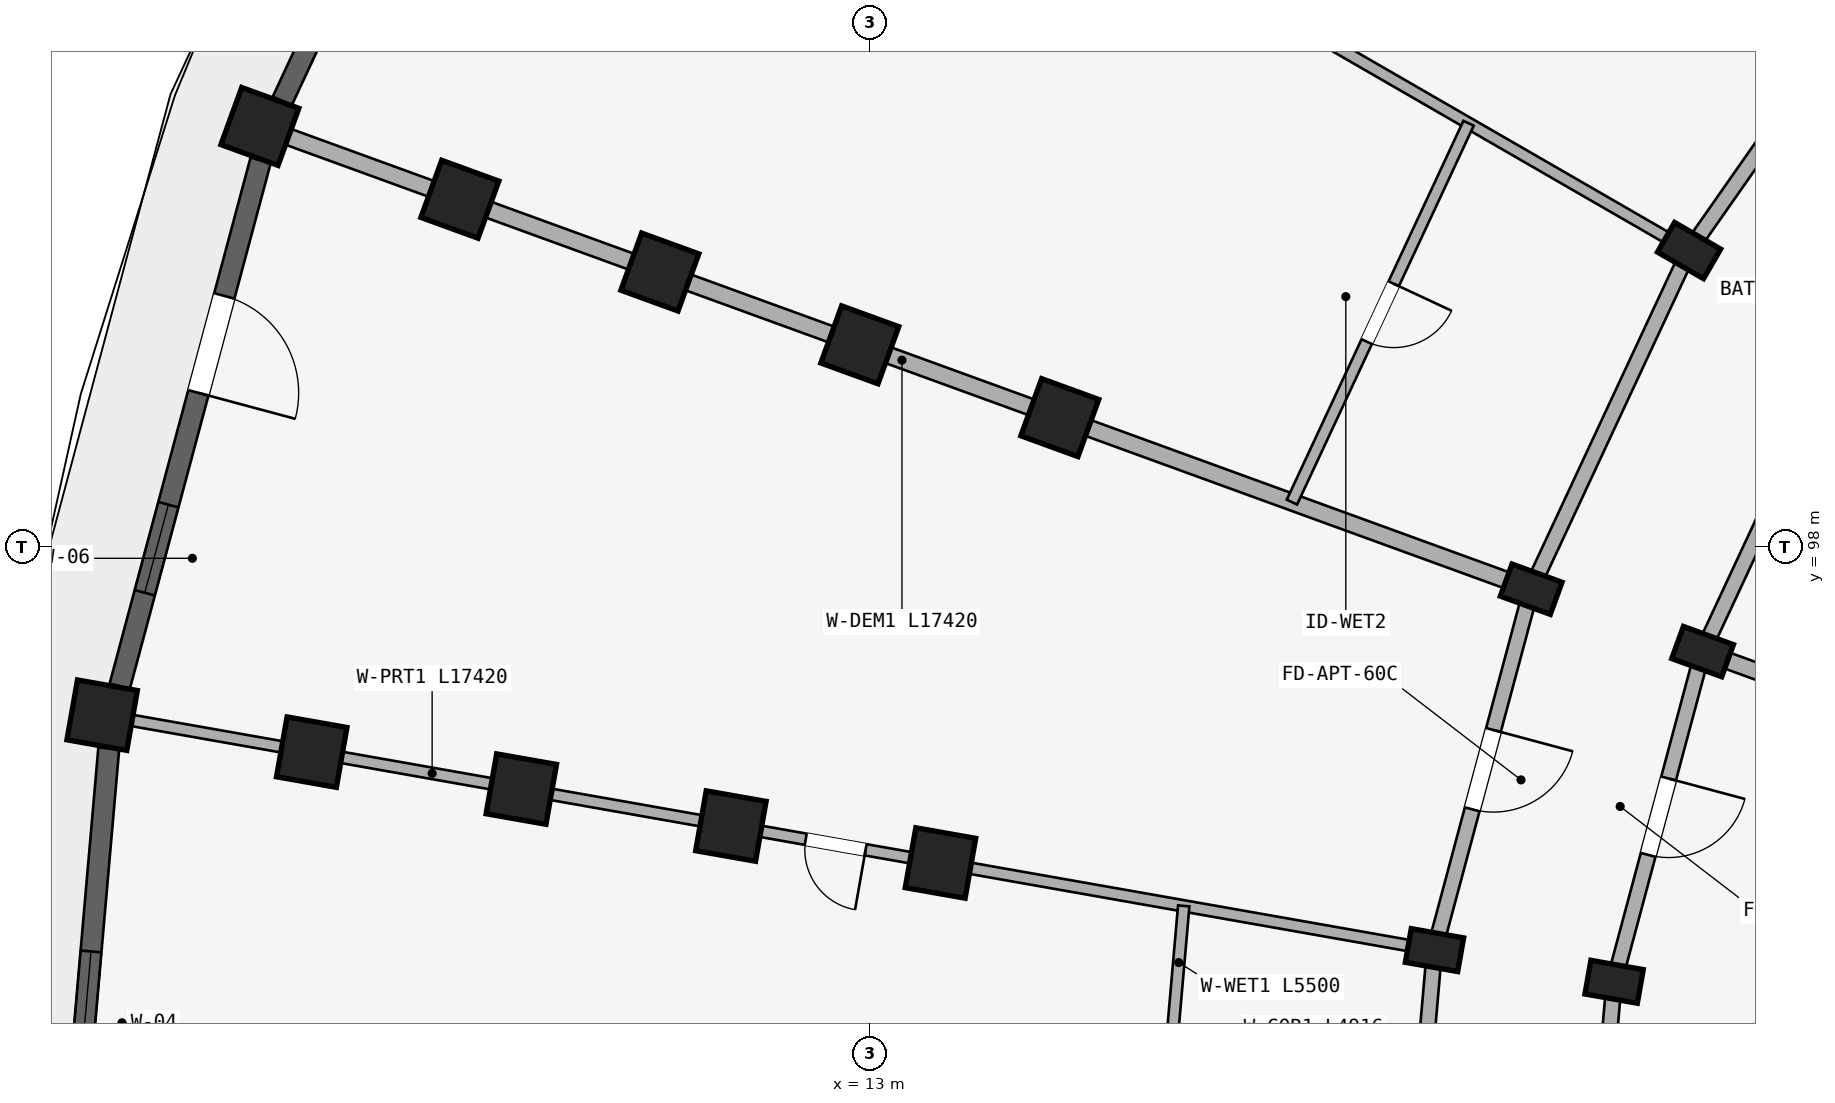
"""IFC4 building model, lengths in metres.
Left out: names, types, materials, properties, quantities, classifications, styles, units other than length and angle.
Written with IfcOpenShell. Run it as: python <this file> out.ifc"""

import sys

from ifc_helpers import new_model, si_unit, direction, frame, frame_2d, origin, origin_2d, place, context, subcontext, project, spatial, rectangle, extrude, element, fill, save


model = new_model("IFC4")
c1 = context("Model", 3, precision=1e-05, world=origin(), true_north=direction((0.0, 1.0)))
c2 = subcontext(c1, "Body", "Model", "MODEL_VIEW")
j1 = project(units=[si_unit("LENGTHUNIT", "METRE"), si_unit("PLANEANGLEUNIT", "RADIAN")], contexts=[c1])
p1 = place(None, origin())
s1 = spatial("IfcSite", under=j1, at=p1, CompositionType="ELEMENT")
p2 = place(p1, origin())
s2 = spatial("IfcBuilding", under=s1, at=p2, CompositionType="ELEMENT")
p3 = place(p2, frame((0.0, 0.0, 15.0)))
s3 = spatial("IfcBuildingStorey", under=s2, at=p3, CompositionType="ELEMENT", Elevation=15.0)
for number, where, z_axis, x_axis in (
    (1, (23.778, 101.9, 0.0), (0.0, 0.0, 1.0), (0.5, 0.866, 0.0)),
    (2, (23.956, 96.624, 0.0), (0.0, 0.0, 1.0), (0.342, 0.94, 0.0)),
    (3, (21.701, 97.445, 0.0), (0.0, 0.0, 1.0), (0.342, 0.94, 0.0)),
):
    element("IfcColumn", number, at=place(p3, frame(where, z_axis=z_axis, x_axis=x_axis)), inside=s3, PredefinedType="COLUMN", context=c2, shape_type="SweptSolid", body=[
        extrude(rectangle(XDim=0.45, YDim=0.7, at=origin_2d()), origin(), (0.0, 0.0, 1.0), 2.93),
    ])
for number, where, z_axis, x_axis in (
    (4, (15.499, 99.702, 0.0), (0.0, 0.0, 1.0), (0.342, 0.94, 0.0)),
    (5, (12.868, 100.66, 0.0), (0.0, 0.0, 1.0), (0.342, 0.94, 0.0)),
    (6, (10.236, 101.618, 0.0), (0.0, 0.0, 1.0), (0.342, 0.94, 0.0)),
    (7, (7.605, 102.575, 0.0), (0.0, 0.0, 1.0), (0.342, 0.94, 0.0)),
    (8, (4.974, 103.533, 0.0), (0.0, 0.0, 1.0), (0.342, 0.94, 0.0)),
):
    element("IfcColumn", number, at=place(p3, frame(where, z_axis=z_axis, x_axis=x_axis)), inside=s3, PredefinedType="COLUMN", context=c2, shape_type="SweptSolid", body=[
        extrude(rectangle(XDim=0.8, YDim=0.8, at=origin_2d()), origin(), (0.0, 0.0, 1.0), 2.93),
    ])
for number, where, z_axis, x_axis in (
    (9, (22.792, 92.28, 0.0), (0.0, 0.0, 1.0), (0.174, 0.985, 0.0)),
    (10, (20.428, 92.697, 0.0), (0.0, 0.0, 1.0), (0.174, 0.985, 0.0)),
):
    element("IfcColumn", number, at=place(p3, frame(where, z_axis=z_axis, x_axis=x_axis)), inside=s3, PredefinedType="COLUMN", context=c2, shape_type="SweptSolid", body=[
        extrude(rectangle(XDim=0.45, YDim=0.7, at=origin_2d()), origin(), (0.0, 0.0, 1.0), 2.93),
    ])
for number, where, z_axis, x_axis in (
    (11, (13.929, 93.843, 0.0), (0.0, 0.0, 1.0), (0.174, 0.985, 0.0)),
    (12, (11.171, 94.329, 0.0), (0.0, 0.0, 1.0), (0.174, 0.985, 0.0)),
    (13, (8.414, 94.815, 0.0), (0.0, 0.0, 1.0), (0.174, 0.985, 0.0)),
    (14, (5.656, 95.302, 0.0), (0.0, 0.0, 1.0), (0.174, 0.985, 0.0)),
    (15, (2.899, 95.788, 0.0), (0.0, 0.0, 1.0), (0.174, 0.985, 0.0)),
):
    element("IfcColumn", number, at=place(p3, frame(where, z_axis=z_axis, x_axis=x_axis)), inside=s3, PredefinedType="COLUMN", context=c2, shape_type="SweptSolid", body=[
        extrude(rectangle(XDim=0.8, YDim=0.8, at=origin_2d()), origin(), (0.0, 0.0, 1.0), 2.93),
    ])
p4 = place(p3, frame((26.598, 105.927, 0.0), z_axis=(0.0, 0.0, 1.0), x_axis=(-0.573592335331, -0.819140911474, 0.0)))
e16 = element("IfcWall", 16, at=p4, inside=s3, PredefinedType="STANDARD", context=c2, shape_type="SweptSolid", body=[
    extrude(rectangle(XDim=4.916, YDim=0.2, at=frame_2d((2.458, 0.0))), origin(), (0.0, 0.0, 1.0), 2.372),
])
p5 = place(p4, frame((1.938, 0.0, 0.0)))
e17 = element("IfcOpeningElement", 17, at=p5, cuts=e16, PredefinedType="OPENING", context=c2, shape_type="SweptSolid", body=[
    extrude(rectangle(XDim=1.04, YDim=2.15, at=frame_2d((0.52, 1.075))), frame((0.0, 0.11, 0.0), z_axis=(0.0, -1.0, 0.0), x_axis=(1.0, 0.0, 0.0)), (0.0, 0.0, 1.0), 0.22),
])
p6 = place(p3, frame((25.856, 100.7, 0.0), z_axis=(0.0, 0.0, 1.0), x_axis=(-0.422617978463, -0.906307919131, 0.0)))
e18 = element("IfcWall", 18, at=p6, inside=s3, PredefinedType="STANDARD", context=c2, shape_type="SweptSolid", body=[
    extrude(rectangle(XDim=4.497, YDim=0.2, at=frame_2d((2.249, 0.0))), origin(), (0.0, 0.0, 1.0), 2.372),
])
p7 = place(p3, frame((23.778, 101.9, 0.0), z_axis=(0.0, 0.0, 1.0), x_axis=(-0.422629854778, -0.906302381024, 0.0)))
e19 = element("IfcWall", 19, at=p7, inside=s3, PredefinedType="STANDARD", context=c2, shape_type="SweptSolid", body=[
    extrude(rectangle(XDim=4.915, YDim=0.2, at=frame_2d((2.458, 0.0))), origin(), (0.0, 0.0, 1.0), 2.372),
])
p8 = place(p3, frame((23.956, 96.624, 0.0), z_axis=(0.0, 0.0, 1.0), x_axis=(-0.258787642463, -0.965934240054, 0.0)))
e20 = element("IfcWall", 20, at=p8, inside=s3, PredefinedType="STANDARD", context=c2, shape_type="SweptSolid", body=[
    extrude(rectangle(XDim=4.497, YDim=0.2, at=frame_2d((2.249, 0.0))), origin(), (0.0, 0.0, 1.0), 2.372),
])
p9 = place(p8, frame((1.729, 0.0, 0.0)))
e21 = element("IfcOpeningElement", 21, at=p9, cuts=e20, PredefinedType="OPENING", context=c2, shape_type="SweptSolid", body=[
    extrude(rectangle(XDim=1.04, YDim=2.15, at=frame_2d((0.52, 1.075))), frame((0.0, 0.11, 0.0), z_axis=(0.0, -1.0, 0.0), x_axis=(1.0, 0.0, 0.0)), (0.0, 0.0, 1.0), 0.22),
])
p10 = place(p3, frame((21.701, 97.445, 0.0), z_axis=(0.0, 0.0, 1.0), x_axis=(-0.258803112091, -0.965930095386, 0.0)))
e22 = element("IfcWall", 22, at=p10, inside=s3, PredefinedType="STANDARD", context=c2, shape_type="SweptSolid", body=[
    extrude(rectangle(XDim=4.916, YDim=0.2, at=frame_2d((2.458, 0.0))), origin(), (0.0, 0.0, 1.0), 2.372),
])
p11 = place(p10, frame((1.918, 0.0, 0.0)))
e23 = element("IfcOpeningElement", 23, at=p11, cuts=e22, PredefinedType="OPENING", context=c2, shape_type="SweptSolid", body=[
    extrude(rectangle(XDim=1.08, YDim=2.15, at=frame_2d((0.54, 1.075))), frame((0.0, 0.11, 0.0), z_axis=(0.0, -1.0, 0.0), x_axis=(1.0, 0.0, 0.0)), (0.0, 0.0, 1.0), 0.22),
])
p12 = place(p3, frame((22.792, 92.28, 0.0), z_axis=(0.0, 0.0, 1.0), x_axis=(-0.087187153726, -0.996191949488, 0.0)))
e24 = element("IfcWall", 24, at=p12, inside=s3, PredefinedType="STANDARD", context=c2, shape_type="SweptSolid", body=[
    extrude(rectangle(XDim=4.497, YDim=0.2, at=frame_2d((2.249, 0.0))), origin(), (0.0, 0.0, 1.0), 2.372),
])
p13 = place(p3, frame((20.428, 92.697, 0.0), z_axis=(0.0, 0.0, 1.0), x_axis=(-0.087167566415, -0.996193663584, 0.0)))
e25 = element("IfcWall", 25, at=p13, inside=s3, PredefinedType="STANDARD", context=c2, shape_type="SweptSolid", body=[
    extrude(rectangle(XDim=4.916, YDim=0.2, at=frame_2d((2.458, 0.0))), origin(), (0.0, 0.0, 1.0), 2.372),
])
p14 = place(p3, frame((23.691, 101.95, 0.0), z_axis=(0.0, 0.0, 1.0), x_axis=(-0.866026648973, 0.499997843263, 0.0)))
e26 = element("IfcWall", 26, at=p14, inside=s3, PredefinedType="PARTITIONING", context=c2, shape_type="SweptSolid", body=[
    extrude(rectangle(XDim=17.42, YDim=0.15, at=frame_2d((8.71, 0.0))), origin(), (0.0, 0.0, 1.0), 2.372),
])
p15 = place(p14, frame((7.5, 0.0, 0.0)))
e27 = element("IfcOpeningElement", 27, at=p15, cuts=e26, PredefinedType="OPENING", context=c2, shape_type="SweptSolid", body=[
    extrude(rectangle(XDim=0.8, YDim=2.1, at=frame_2d((0.4, 1.05))), frame((0.0, 0.085, 0.0), z_axis=(0.0, -1.0, 0.0), x_axis=(1.0, 0.0, 0.0)), (0.0, 0.0, 1.0), 0.17),
])
p16 = place(p3, frame((30.346, 94.298, 0.0), z_axis=(0.0, 0.0, 1.0), x_axis=(-0.939696231917, 0.342010221662, 0.0)))
e28 = element("IfcWall", 28, at=p16, inside=s3, PredefinedType="STANDARD", context=c2, shape_type="SweptSolid", body=[
    extrude(rectangle(XDim=6.75, YDim=0.22, at=frame_2d((3.375, 0.0))), origin(), (0.0, 0.0, 1.0), 2.372),
])
p17 = place(p3, frame((21.607, 97.479, 0.0), z_axis=(0.0, 0.0, 1.0), x_axis=(-0.939691901159, 0.342022120477, 0.0)))
e29 = element("IfcWall", 29, at=p17, inside=s3, PredefinedType="STANDARD", context=c2, shape_type="SweptSolid", body=[
    extrude(rectangle(XDim=17.42, YDim=0.22, at=frame_2d((8.71, 0.0))), origin(), (0.0, 0.0, 1.0), 2.372),
])
p18 = place(p3, frame((20.33, 92.714, 0.0), z_axis=(0.0, 0.0, 1.0), x_axis=(-0.984808098809, 0.173646216546, 0.0)))
e30 = element("IfcWall", 30, at=p18, inside=s3, PredefinedType="PARTITIONING", context=c2, shape_type="SweptSolid", body=[
    extrude(rectangle(XDim=17.42, YDim=0.15, at=frame_2d((8.71, 0.0))), origin(), (0.0, 0.0, 1.0), 2.372),
])
p19 = place(p18, frame((7.5, 0.0, 0.0)))
e31 = element("IfcOpeningElement", 31, at=p19, cuts=e30, PredefinedType="OPENING", context=c2, shape_type="SweptSolid", body=[
    extrude(rectangle(XDim=0.8, YDim=2.1, at=frame_2d((0.4, 1.05))), frame((0.0, 0.085, 0.0), z_axis=(0.0, -1.0, 0.0), x_axis=(1.0, 0.0, 0.0)), (0.0, 0.0, 1.0), 0.17),
])
p20 = place(p3, frame((20.877, 103.575, 0.0), z_axis=(0.0, 0.0, 1.0), x_axis=(-0.422630264446, -0.906302189986, 0.0)))
e32 = element("IfcWall", 32, at=p20, inside=s3, PredefinedType="PLUMBINGWALL", context=c2, shape_type="SweptSolid", body=[
    extrude(rectangle(XDim=5.5, YDim=0.15, at=frame_2d((2.75, 0.0))), origin(), (0.0, 0.0, 1.0), 2.372),
])
p21 = place(p20, frame((2.33, 0.0, 0.0)))
e33 = element("IfcOpeningElement", 33, at=p21, cuts=e32, PredefinedType="OPENING", context=c2, shape_type="SweptSolid", body=[
    extrude(rectangle(XDim=0.84, YDim=2.1, at=frame_2d((0.42, 1.05))), frame((0.0, 0.085, 0.0), z_axis=(0.0, -1.0, 0.0), x_axis=(1.0, 0.0, 0.0)), (0.0, 0.0, 1.0), 0.17),
])
p22 = place(p3, frame((17.129, 93.279, 0.0), z_axis=(0.0, 0.0, 1.0), x_axis=(-0.087188978393, -0.996191789791, 0.0)))
e34 = element("IfcWall", 34, at=p22, inside=s3, PredefinedType="PLUMBINGWALL", context=c2, shape_type="SweptSolid", body=[
    extrude(rectangle(XDim=5.5, YDim=0.15, at=frame_2d((2.75, 0.0))), origin(), (0.0, 0.0, 1.0), 2.372),
])
p23 = place(p22, frame((2.35, 0.0, 0.0)))
e35 = element("IfcOpeningElement", 35, at=p23, cuts=e34, PredefinedType="OPENING", context=c2, shape_type="SweptSolid", body=[
    extrude(rectangle(XDim=0.8, YDim=2.1, at=frame_2d((0.4, 1.05))), frame((0.0, 0.085, 0.0), z_axis=(0.0, -1.0, 0.0), x_axis=(1.0, 0.0, 0.0)), (0.0, 0.0, 1.0), 0.17),
])
p24 = place(p3, frame((8.296, 110.36, 0.0), z_axis=(0.0, 0.0, 1.0), x_axis=(-0.422633596215, -0.906300636296, 0.0)))
e36 = element("IfcWall", 36, at=p24, inside=s3, PredefinedType="STANDARD", context=c2, shape_type="SweptSolid", body=[
    extrude(rectangle(XDim=7.164, YDim=0.275, at=frame_2d((3.582, 0.0))), origin(), (0.0, 0.0, 1.0), 2.472),
])
p25 = place(p24, frame((2.532, 0.0, 0.472)))
e37 = element("IfcOpeningElement", 37, at=p25, cuts=e36, PredefinedType="OPENING", context=c2, shape_type="SweptSolid", body=[
    extrude(rectangle(XDim=2.1, YDim=1.8, at=frame_2d((1.05, 0.9))), frame((0.0, 0.147, 0.0), z_axis=(0.0, -1.0, 0.0), x_axis=(1.0, 0.0, 0.0)), (0.0, 0.0, 1.0), 0.295),
])
p26 = place(p3, frame((4.984, 103.088, 0.0), z_axis=(0.0, 0.0, 1.0), x_axis=(-0.258826933296, -0.965923712619, 0.0)))
e38 = element("IfcWall", 38, at=p26, inside=s3, PredefinedType="STANDARD", context=c2, shape_type="SweptSolid", body=[
    extrude(rectangle(XDim=7.164, YDim=0.275, at=frame_2d((3.582, 0.0))), origin(), (0.0, 0.0, 1.0), 2.472),
])
p27 = place(p26, frame((4.69, 0.0, 0.422)))
e39 = element("IfcOpeningElement", 39, at=p27, cuts=e38, PredefinedType="OPENING", context=c2, shape_type="SweptSolid", body=[
    extrude(rectangle(XDim=1.2, YDim=1.5, at=frame_2d((0.6, 0.75))), frame((0.0, 0.147, 0.0), z_axis=(0.0, -1.0, 0.0), x_axis=(1.0, 0.0, 0.0)), (0.0, 0.0, 1.0), 0.295),
])
p28 = place(p26, frame((1.847, 0.0, 0.0)))
e40 = element("IfcOpeningElement", 40, at=p28, cuts=e38, PredefinedType="OPENING", context=c2, shape_type="SweptSolid", body=[
    extrude(rectangle(XDim=1.32, YDim=2.15, at=frame_2d((0.66, 1.075))), frame((0.0, 0.147, 0.0), z_axis=(0.0, -1.0, 0.0), x_axis=(1.0, 0.0, 0.0)), (0.0, 0.0, 1.0), 0.295),
])
p29 = place(p3, frame((2.986, 95.351, 0.0), z_axis=(0.0, 0.0, 1.0), x_axis=(-0.08713989423, -0.99619608453, 0.0)))
e41 = element("IfcWall", 41, at=p29, inside=s3, PredefinedType="STANDARD", context=c2, shape_type="SweptSolid", body=[
    extrude(rectangle(XDim=7.164, YDim=0.275, at=frame_2d((3.582, 0.0))), origin(), (0.0, 0.0, 1.0), 2.472),
])
p30 = place(p29, frame((2.682, 0.0, 0.622)))
e42 = element("IfcOpeningElement", 42, at=p30, cuts=e41, PredefinedType="OPENING", context=c2, shape_type="SweptSolid", body=[
    extrude(rectangle(XDim=1.8, YDim=1.65, at=frame_2d((0.9, 0.825))), frame((0.0, 0.147, 0.0), z_axis=(0.0, -1.0, 0.0), x_axis=(1.0, 0.0, 0.0)), (0.0, 0.0, 1.0), 0.295),
])
p31 = place(p27, origin())
e43 = element("IfcWindow", 43, at=p31, inside=s3, PartitioningType="SINGLE_PANEL", PredefinedType="WINDOW", context=c2, shape_type="SweptSolid", body=[
    extrude(rectangle(XDim=1.2, YDim=1.5, at=frame_2d((0.6, 0.75))), frame((0.0, 0.03, 0.0), z_axis=(0.0, -1.0, 0.0), x_axis=(1.0, 0.0, 0.0)), (0.0, 0.0, 1.0), 0.06),
])
fill(e39, e43)
p32 = place(p30, origin())
e44 = element("IfcWindow", 44, at=p32, inside=s3, PartitioningType="DOUBLE_PANEL_VERTICAL", PredefinedType="WINDOW", context=c2, shape_type="SweptSolid", body=[
    extrude(rectangle(XDim=1.8, YDim=1.65, at=frame_2d((0.9, 0.825))), frame((0.0, 0.03, 0.0), z_axis=(0.0, -1.0, 0.0), x_axis=(1.0, 0.0, 0.0)), (0.0, 0.0, 1.0), 0.06),
])
fill(e42, e44)
p33 = place(p19, frame((0.8, 0.0, 0.0), z_axis=(0.0, 0.0, 1.0), x_axis=(-1.0, 0.0, 0.0)))
e45 = element("IfcDoor", 45, at=p33, inside=s3, OperationType="SINGLE_SWING_RIGHT", PredefinedType="DOOR", context=c2, shape_type="SweptSolid", body=[
    extrude(rectangle(XDim=0.8, YDim=2.1, at=frame_2d((0.4, 1.05))), frame((0.0, 0.025, 0.0), z_axis=(0.0, -1.0, 0.0), x_axis=(1.0, 0.0, 0.0)), (0.0, 0.0, 1.0), 0.05),
])
fill(e31, e45)
p34 = place(p21, origin())
e46 = element("IfcDoor", 46, at=p34, inside=s3, OperationType="SINGLE_SWING_LEFT", PredefinedType="DOOR", context=c2, shape_type="SweptSolid", body=[
    extrude(rectangle(XDim=0.84, YDim=2.1, at=frame_2d((0.42, 1.05))), frame((0.0, 0.025, 0.0), z_axis=(0.0, -1.0, 0.0), x_axis=(1.0, 0.0, 0.0)), (0.0, 0.0, 1.0), 0.05),
])
fill(e33, e46)
p35 = place(p11, frame((1.08, 0.0, 0.0), z_axis=(0.0, 0.0, 1.0), x_axis=(-1.0, 0.0, 0.0)))
e47 = element("IfcDoor", 47, at=p35, inside=s3, OperationType="SINGLE_SWING_RIGHT", PredefinedType="DOOR", context=c2, shape_type="SweptSolid", body=[
    extrude(rectangle(XDim=1.08, YDim=2.15, at=frame_2d((0.54, 1.075))), frame((0.0, 0.025, 0.0), z_axis=(0.0, -1.0, 0.0), x_axis=(1.0, 0.0, 0.0)), (0.0, 0.0, 1.0), 0.05),
])
fill(e23, e47)
p36 = place(p9, origin())
e48 = element("IfcDoor", 48, at=p36, inside=s3, OperationType="SINGLE_SWING_LEFT", PredefinedType="DOOR", context=c2, shape_type="SweptSolid", body=[
    extrude(rectangle(XDim=1.04, YDim=2.15, at=frame_2d((0.52, 1.075))), frame((0.0, 0.025, 0.0), z_axis=(0.0, -1.0, 0.0), x_axis=(1.0, 0.0, 0.0)), (0.0, 0.0, 1.0), 0.05),
])
fill(e21, e48)
p37 = place(p28, frame((1.32, 0.0, 0.0), z_axis=(0.0, 0.0, 1.0), x_axis=(-1.0, 0.0, 0.0)))
e49 = element("IfcDoor", 49, at=p37, inside=s3, OperationType="SINGLE_SWING_LEFT", PredefinedType="DOOR", context=c2, shape_type="SweptSolid", body=[
    extrude(rectangle(XDim=1.32, YDim=2.15, at=frame_2d((0.66, 1.075))), frame((0.0, 0.025, 0.0), z_axis=(0.0, -1.0, 0.0), x_axis=(1.0, 0.0, 0.0)), (0.0, 0.0, 1.0), 0.05),
])
fill(e40, e49)
save(model, sys.argv[1])
